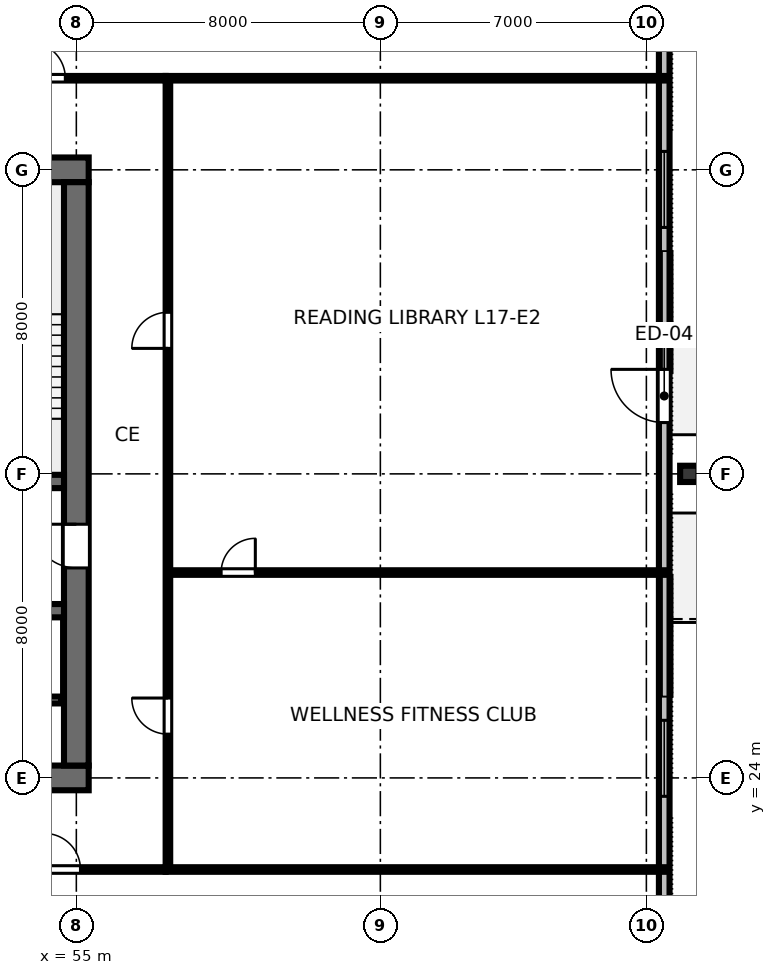
"""IFC4 building model, lengths in metres.
Left out: names, types, materials, properties, quantities, classifications, styles, units other than length and angle.
Written with IfcOpenShell. Run it as: python <this file> out.ifc"""

import sys

from ifc_helpers import new_model, si_unit, direction, frame, frame_2d, origin, origin_2d, place, context, subcontext, project, spatial, rectangle, i_section, extrude, element, fill, save


model = new_model("IFC4")
c1 = context("Model", 3, precision=1e-05, world=origin(), true_north=direction((0.0, 1.0)))
c2 = subcontext(c1, "Body", "Model", "MODEL_VIEW")
j1 = project(units=[si_unit("LENGTHUNIT", "METRE"), si_unit("PLANEANGLEUNIT", "RADIAN")], contexts=[c1])
p1 = place(None, origin())
s1 = spatial("IfcSite", under=j1, at=p1, CompositionType="ELEMENT")
p2 = place(p1, origin())
s2 = spatial("IfcBuilding", under=s1, at=p2, CompositionType="ELEMENT")
p3 = place(p2, frame((0.0, 0.0, 67.6)))
s3 = spatial("IfcBuildingStorey", under=s2, at=p3, CompositionType="ELEMENT", Elevation=67.6)
p4 = place(p3, frame((36.675, 24.0, 0.0), z_axis=(0.0, 0.0, 1.0), x_axis=(1.0, 0.0, 0.0)))
e1 = element("IfcWall", 1, at=p4, inside=s3, PredefinedType="SHEAR", context=c2, shape_type="SweptSolid", body=[
    extrude(rectangle(XDim=18.65, YDim=0.65, at=frame_2d((9.325, 0.0))), origin(), (0.0, 0.0, 1.0), 3.36),
])
p5 = place(p4, frame((5.725, 0.0, 0.0)))
e2 = element("IfcOpeningElement", 2, at=p5, cuts=e1, PredefinedType="OPENING", context=c2, shape_type="SweptSolid", body=[
    extrude(rectangle(XDim=1.6, YDim=2.15, at=frame_2d((0.8, 1.075))), frame((0.0, 0.335, 0.0), z_axis=(0.0, -1.0, 0.0), x_axis=(1.0, 0.0, 0.0)), (0.0, 0.0, 1.0), 0.67),
])
p6 = place(p4, frame((12.125, 0.0, 0.0)))
e3 = element("IfcOpeningElement", 3, at=p6, cuts=e1, PredefinedType="OPENING", context=c2, shape_type="SweptSolid", body=[
    extrude(rectangle(XDim=1.6, YDim=2.15, at=frame_2d((0.8, 1.075))), frame((0.0, 0.335, 0.0), z_axis=(0.0, -1.0, 0.0), x_axis=(1.0, 0.0, 0.0)), (0.0, 0.0, 1.0), 0.67),
])
p7 = place(p3, frame((36.675, 40.0, 0.0), z_axis=(0.0, 0.0, 1.0), x_axis=(1.0, 0.0, 0.0)))
e4 = element("IfcWall", 4, at=p7, inside=s3, PredefinedType="SHEAR", context=c2, shape_type="SweptSolid", body=[
    extrude(rectangle(XDim=18.65, YDim=0.65, at=frame_2d((9.325, 0.0))), origin(), (0.0, 0.0, 1.0), 3.36),
])
p8 = place(p7, frame((10.625, 0.0, 0.0)))
e5 = element("IfcOpeningElement", 5, at=p8, cuts=e4, PredefinedType="OPENING", context=c2, shape_type="SweptSolid", body=[
    extrude(rectangle(XDim=1.0, YDim=2.15, at=frame_2d((0.5, 1.075))), frame((0.0, 0.335, 0.0), z_axis=(0.0, -1.0, 0.0), x_axis=(1.0, 0.0, 0.0)), (0.0, 0.0, 1.0), 0.67),
])
p9 = place(p3, frame((55.0, 24.325, 0.0), z_axis=(0.0, 0.0, 1.0), x_axis=(0.0, 1.0, 0.0)))
e6 = element("IfcWall", 6, at=p9, inside=s3, PredefinedType="SHEAR", context=c2, shape_type="SweptSolid", body=[
    extrude(rectangle(XDim=15.35, YDim=0.65, at=frame_2d((7.675, 0.0))), origin(), (0.0, 0.0, 1.0), 3.36),
])
p10 = place(p9, frame((5.2, 0.0, 0.0)))
e7 = element("IfcOpeningElement", 7, at=p10, cuts=e6, PredefinedType="OPENING", context=c2, shape_type="SweptSolid", body=[
    extrude(rectangle(XDim=1.15, YDim=2.15, at=frame_2d((0.575, 1.075))), frame((0.0, 0.335, 0.0), z_axis=(0.0, -1.0, 0.0), x_axis=(1.0, 0.0, 0.0)), (0.0, 0.0, 1.0), 0.67),
])
p11 = place(p3, frame((37.325, 31.8, 0.0), z_axis=(0.0, 0.0, 1.0), x_axis=(1.0, 0.0, 0.0)))
e8 = element("IfcWall", 8, at=p11, inside=s3, PredefinedType="SHEAR", context=c2, shape_type="SweptSolid", body=[
    extrude(rectangle(XDim=17.35, YDim=0.35, at=frame_2d((8.675, 0.0))), origin(), (0.0, 0.0, 1.0), 3.36),
])
p12 = place(p11, frame((0.725, 0.0, 0.0)))
e9 = element("IfcOpeningElement", 9, at=p12, cuts=e8, PredefinedType="OPENING", context=c2, shape_type="SweptSolid", body=[
    extrude(rectangle(XDim=1.1, YDim=2.15, at=frame_2d((0.55, 1.075))), frame((0.0, 0.185, 0.0), z_axis=(0.0, -1.0, 0.0), x_axis=(1.0, 0.0, 0.0)), (0.0, 0.0, 1.0), 0.37),
])
p13 = place(p11, frame((14.625, 0.0, 0.0)))
e10 = element("IfcOpeningElement", 10, at=p13, cuts=e8, PredefinedType="OPENING", context=c2, shape_type="SweptSolid", body=[
    extrude(rectangle(XDim=1.1, YDim=2.15, at=frame_2d((0.55, 1.075))), frame((0.0, 0.185, 0.0), z_axis=(0.0, -1.0, 0.0), x_axis=(1.0, 0.0, 0.0)), (0.0, 0.0, 1.0), 0.37),
])
p14 = place(p3, frame((37.325, 28.4, 0.0), z_axis=(0.0, 0.0, 1.0), x_axis=(1.0, 0.0, 0.0)))
e11 = element("IfcWall", 11, at=p14, inside=s3, PredefinedType="SHEAR", context=c2, shape_type="SweptSolid", body=[
    extrude(rectangle(XDim=17.35, YDim=0.35, at=frame_2d((8.675, 0.0))), origin(), (0.0, 0.0, 1.0), 3.36),
])
p15 = place(p3, frame((71.13, 32.0, 0.0), z_axis=(0.103698486948, 0.0, 0.994608779272), x_axis=(-0.994608779272, 0.0, 0.103698486948)))
e12 = element("IfcColumn", 12, at=p15, inside=s3, PredefinedType="COLUMN", context=c2, shape_type="SweptSolid", body=[
    extrude(i_section(OverallWidth=0.428, OverallDepth=0.483, WebThickness=0.051, FlangeThickness=0.082, FilletRadius=0.025, at=origin_2d()), origin(), (0.0, 0.0, 1.0), 3.376),
])
p16 = place(p3, frame((70.47, 14.06, 0.0), z_axis=(0.0, 0.0, 1.0), x_axis=(0.0, 1.0, 0.0)))
e13 = element("IfcWall", 13, at=p16, inside=s3, PredefinedType="STANDARD", context=c2, shape_type="SweptSolid", body=[
    extrude(rectangle(XDim=35.88, YDim=0.28, at=frame_2d((17.94, 0.0))), origin(), (0.0, 0.0, 1.0), 3.36),
])
p17 = place(p16, frame((19.29, 0.0, 0.0)))
e14 = element("IfcOpeningElement", 14, at=p17, cuts=e13, PredefinedType="OPENING", context=c2, shape_type="SweptSolid", body=[
    extrude(rectangle(XDim=1.4, YDim=2.15, at=frame_2d((0.7, 1.075))), frame((0.0, 0.15, 0.0), z_axis=(0.0, -1.0, 0.0), x_axis=(1.0, 0.0, 0.0)), (0.0, 0.0, 1.0), 0.3),
])
p18 = place(p16, frame((1.971, 0.0, 0.8)))
e15 = element("IfcOpeningElement", 15, at=p18, cuts=e13, PredefinedType="OPENING", context=c2, shape_type="SweptSolid", body=[
    extrude(rectangle(XDim=2.0, YDim=1.95, at=frame_2d((1.0, 0.975))), frame((0.0, 0.15, 0.0), z_axis=(0.0, -1.0, 0.0), x_axis=(1.0, 0.0, 0.0)), (0.0, 0.0, 1.0), 0.3),
])
p19 = place(p16, frame((9.456, 0.0, 0.8)))
e16 = element("IfcOpeningElement", 16, at=p19, cuts=e13, PredefinedType="OPENING", context=c2, shape_type="SweptSolid", body=[
    extrude(rectangle(XDim=2.0, YDim=1.95, at=frame_2d((1.0, 0.975))), frame((0.0, 0.15, 0.0), z_axis=(0.0, -1.0, 0.0), x_axis=(1.0, 0.0, 0.0)), (0.0, 0.0, 1.0), 0.3),
])
p20 = place(p16, frame((24.424, 0.0, 0.8)))
e17 = element("IfcOpeningElement", 17, at=p20, cuts=e13, PredefinedType="OPENING", context=c2, shape_type="SweptSolid", body=[
    extrude(rectangle(XDim=2.0, YDim=1.95, at=frame_2d((1.0, 0.975))), frame((0.0, 0.15, 0.0), z_axis=(0.0, -1.0, 0.0), x_axis=(1.0, 0.0, 0.0)), (0.0, 0.0, 1.0), 0.3),
])
p21 = place(p16, frame((31.909, 0.0, 0.8)))
e18 = element("IfcOpeningElement", 18, at=p21, cuts=e13, PredefinedType="OPENING", context=c2, shape_type="SweptSolid", body=[
    extrude(rectangle(XDim=2.0, YDim=1.95, at=frame_2d((1.0, 0.975))), frame((0.0, 0.15, 0.0), z_axis=(0.0, -1.0, 0.0), x_axis=(1.0, 0.0, 0.0)), (0.0, 0.0, 1.0), 0.3),
])
p22 = place(p3, frame((37.4, 26.05, 0.0), z_axis=(0.0, 0.0, 1.0), x_axis=(1.0, 0.0, 0.0)))
e19 = element("IfcWall", 19, at=p22, inside=s3, PredefinedType="PARTITIONING", context=c2, shape_type="SweptSolid", body=[
    extrude(rectangle(XDim=17.2, YDim=0.18, at=frame_2d((8.6, 0.0))), origin(), (0.0, 0.0, 1.0), 3.36),
])
p23 = place(p22, frame((1.1, 0.0, 0.0)))
e20 = element("IfcOpeningElement", 20, at=p23, cuts=e19, PredefinedType="OPENING", context=c2, shape_type="SweptSolid", body=[
    extrude(rectangle(XDim=1.05, YDim=2.15, at=frame_2d((0.525, 1.075))), frame((0.0, 0.1, 0.0), z_axis=(0.0, -1.0, 0.0), x_axis=(1.0, 0.0, 0.0)), (0.0, 0.0, 1.0), 0.2),
])
p24 = place(p22, frame((3.0, 0.0, 0.0)))
e21 = element("IfcOpeningElement", 21, at=p24, cuts=e19, PredefinedType="OPENING", context=c2, shape_type="SweptSolid", body=[
    extrude(rectangle(XDim=1.05, YDim=2.15, at=frame_2d((0.525, 1.075))), frame((0.0, 0.1, 0.0), z_axis=(0.0, -1.0, 0.0), x_axis=(1.0, 0.0, 0.0)), (0.0, 0.0, 1.0), 0.2),
])
p25 = place(p3, frame((34.65, 21.59, 0.0), z_axis=(0.0, 0.0, 1.0), x_axis=(1.0, 0.0, 0.0)))
e22 = element("IfcWall", 22, at=p25, inside=s3, PredefinedType="PARTITIONING", context=c2, shape_type="SweptSolid", body=[
    extrude(rectangle(XDim=22.7, YDim=0.12, at=frame_2d((11.35, 0.0))), origin(), (0.0, 0.0, 1.0), 2.64),
])
p26 = place(p25, frame((3.365, 0.0, 0.0)))
e23 = element("IfcOpeningElement", 23, at=p26, cuts=e22, PredefinedType="OPENING", context=c2, shape_type="SweptSolid", body=[
    extrude(rectangle(XDim=0.95, YDim=2.15, at=frame_2d((0.475, 1.075))), frame((0.0, 0.07, 0.0), z_axis=(0.0, -1.0, 0.0), x_axis=(1.0, 0.0, 0.0)), (0.0, 0.0, 1.0), 0.14),
])
p27 = place(p25, frame((8.718, 0.0, 0.0)))
e24 = element("IfcOpeningElement", 24, at=p27, cuts=e22, PredefinedType="OPENING", context=c2, shape_type="SweptSolid", body=[
    extrude(rectangle(XDim=0.95, YDim=2.15, at=frame_2d((0.475, 1.075))), frame((0.0, 0.07, 0.0), z_axis=(0.0, -1.0, 0.0), x_axis=(1.0, 0.0, 0.0)), (0.0, 0.0, 1.0), 0.14),
])
p28 = place(p25, frame((13.651, 0.0, 0.0)))
e25 = element("IfcOpeningElement", 25, at=p28, cuts=e22, PredefinedType="OPENING", context=c2, shape_type="SweptSolid", body=[
    extrude(rectangle(XDim=0.95, YDim=2.15, at=frame_2d((0.475, 1.075))), frame((0.0, 0.07, 0.0), z_axis=(0.0, -1.0, 0.0), x_axis=(1.0, 0.0, 0.0)), (0.0, 0.0, 1.0), 0.14),
])
p29 = place(p25, frame((19.509, 0.0, 0.0)))
e26 = element("IfcOpeningElement", 26, at=p29, cuts=e22, PredefinedType="OPENING", context=c2, shape_type="SweptSolid", body=[
    extrude(rectangle(XDim=0.95, YDim=2.15, at=frame_2d((0.475, 1.075))), frame((0.0, 0.07, 0.0), z_axis=(0.0, -1.0, 0.0), x_axis=(1.0, 0.0, 0.0)), (0.0, 0.0, 1.0), 0.14),
])
p30 = place(p3, frame((34.65, 42.41, 0.0), z_axis=(0.0, 0.0, 1.0), x_axis=(1.0, 0.0, 0.0)))
e27 = element("IfcWall", 27, at=p30, inside=s3, PredefinedType="PARTITIONING", context=c2, shape_type="SweptSolid", body=[
    extrude(rectangle(XDim=22.7, YDim=0.12, at=frame_2d((11.35, 0.0))), origin(), (0.0, 0.0, 1.0), 2.64),
])
p31 = place(p30, frame((2.59, 0.0, 0.0)))
e28 = element("IfcOpeningElement", 28, at=p31, cuts=e27, PredefinedType="OPENING", context=c2, shape_type="SweptSolid", body=[
    extrude(rectangle(XDim=0.95, YDim=2.15, at=frame_2d((0.475, 1.075))), frame((0.0, 0.07, 0.0), z_axis=(0.0, -1.0, 0.0), x_axis=(1.0, 0.0, 0.0)), (0.0, 0.0, 1.0), 0.14),
])
p32 = place(p30, frame((8.768, 0.0, 0.0)))
e29 = element("IfcOpeningElement", 29, at=p32, cuts=e27, PredefinedType="OPENING", context=c2, shape_type="SweptSolid", body=[
    extrude(rectangle(XDim=0.95, YDim=2.15, at=frame_2d((0.475, 1.075))), frame((0.0, 0.07, 0.0), z_axis=(0.0, -1.0, 0.0), x_axis=(1.0, 0.0, 0.0)), (0.0, 0.0, 1.0), 0.14),
])
p33 = place(p30, frame((14.079, 0.0, 0.0)))
e30 = element("IfcOpeningElement", 30, at=p33, cuts=e27, PredefinedType="OPENING", context=c2, shape_type="SweptSolid", body=[
    extrude(rectangle(XDim=0.95, YDim=2.15, at=frame_2d((0.475, 1.075))), frame((0.0, 0.07, 0.0), z_axis=(0.0, -1.0, 0.0), x_axis=(1.0, 0.0, 0.0)), (0.0, 0.0, 1.0), 0.14),
])
p34 = place(p30, frame((19.11, 0.0, 0.0)))
e31 = element("IfcOpeningElement", 31, at=p34, cuts=e27, PredefinedType="OPENING", context=c2, shape_type="SweptSolid", body=[
    extrude(rectangle(XDim=0.95, YDim=2.15, at=frame_2d((0.475, 1.075))), frame((0.0, 0.07, 0.0), z_axis=(0.0, -1.0, 0.0), x_axis=(1.0, 0.0, 0.0)), (0.0, 0.0, 1.0), 0.14),
])
p35 = place(p3, frame((57.41, 29.404, 0.0), z_axis=(0.0, 0.0, 1.0), x_axis=(1.0, 0.0, 0.0)))
e32 = element("IfcWall", 32, at=p35, inside=s3, PredefinedType="PARTITIONING", context=c2, shape_type="SweptSolid", body=[
    extrude(rectangle(XDim=13.06, YDim=0.12, at=frame_2d((6.53, 0.0))), origin(), (0.0, 0.0, 1.0), 2.64),
])
p36 = place(p35, frame((1.4, 0.0, 0.0)))
e33 = element("IfcOpeningElement", 33, at=p36, cuts=e32, PredefinedType="OPENING", context=c2, shape_type="SweptSolid", body=[
    extrude(rectangle(XDim=0.9, YDim=2.15, at=frame_2d((0.45, 1.075))), frame((0.0, 0.07, 0.0), z_axis=(0.0, -1.0, 0.0), x_axis=(1.0, 0.0, 0.0)), (0.0, 0.0, 1.0), 0.14),
])
p37 = place(p3, frame((57.41, 21.65, 0.0), z_axis=(0.0, 0.0, 1.0), x_axis=(0.0, 1.0, 0.0)))
e34 = element("IfcWall", 34, at=p37, inside=s3, PredefinedType="PARTITIONING", context=c2, shape_type="SweptSolid", body=[
    extrude(rectangle(XDim=20.7, YDim=0.12, at=frame_2d((10.35, 0.0))), origin(), (0.0, 0.0, 1.0), 2.64),
])
p38 = place(p37, frame((3.502, 0.0, 0.0)))
e35 = element("IfcOpeningElement", 35, at=p38, cuts=e34, PredefinedType="OPENING", context=c2, shape_type="SweptSolid", body=[
    extrude(rectangle(XDim=0.95, YDim=2.15, at=frame_2d((0.475, 1.075))), frame((0.0, 0.07, 0.0), z_axis=(0.0, -1.0, 0.0), x_axis=(1.0, 0.0, 0.0)), (0.0, 0.0, 1.0), 0.14),
])
p39 = place(p37, frame((13.652, 0.0, 0.0)))
e36 = element("IfcOpeningElement", 36, at=p39, cuts=e34, PredefinedType="OPENING", context=c2, shape_type="SweptSolid", body=[
    extrude(rectangle(XDim=0.95, YDim=2.15, at=frame_2d((0.475, 1.075))), frame((0.0, 0.07, 0.0), z_axis=(0.0, -1.0, 0.0), x_axis=(1.0, 0.0, 0.0)), (0.0, 0.0, 1.0), 0.14),
])
for number, where, z_axis, x_axis in (
    (37, (57.35, 21.59, 0.0), (0.0, 0.0, 1.0), (1.0, 0.0, 0.0)),
    (38, (57.35, 42.41, 0.0), (0.0, 0.0, 1.0), (1.0, 0.0, 0.0)),
):
    element("IfcWall", number, at=place(p3, frame(where, z_axis=z_axis, x_axis=x_axis)), inside=s3, PredefinedType="PARTITIONING", context=c2, shape_type="SweptSolid", body=[
        extrude(rectangle(XDim=13.12, YDim=0.12, at=frame_2d((6.56, 0.0))), origin(), (0.0, 0.0, 1.0), 2.64),
    ])
p40 = place(p17, origin())
e39 = element("IfcDoor", 39, at=p40, inside=s3, OperationType="SINGLE_SWING_RIGHT", PredefinedType="DOOR", context=c2, shape_type="SweptSolid", body=[
    extrude(rectangle(XDim=1.4, YDim=2.15, at=frame_2d((0.7, 1.075))), frame((0.0, 0.025, 0.0), z_axis=(0.0, -1.0, 0.0), x_axis=(1.0, 0.0, 0.0)), (0.0, 0.0, 1.0), 0.05),
])
fill(e14, e39)
p41 = place(p19, origin())
e40 = element("IfcWindow", 40, at=p41, inside=s3, PartitioningType="SINGLE_PANEL", PredefinedType="WINDOW", context=c2, shape_type="SweptSolid", body=[
    extrude(rectangle(XDim=2.0, YDim=1.95, at=frame_2d((1.0, 0.975))), frame((0.0, 0.03, 0.0), z_axis=(0.0, -1.0, 0.0), x_axis=(1.0, 0.0, 0.0)), (0.0, 0.0, 1.0), 0.06),
])
fill(e16, e40)
p42 = place(p20, origin())
e41 = element("IfcWindow", 41, at=p42, inside=s3, PartitioningType="SINGLE_PANEL", PredefinedType="WINDOW", context=c2, shape_type="SweptSolid", body=[
    extrude(rectangle(XDim=2.0, YDim=1.95, at=frame_2d((1.0, 0.975))), frame((0.0, 0.03, 0.0), z_axis=(0.0, -1.0, 0.0), x_axis=(1.0, 0.0, 0.0)), (0.0, 0.0, 1.0), 0.06),
])
fill(e17, e41)
p43 = place(p10, origin())
e42 = element("IfcDoor", 42, at=p43, inside=s3, OperationType="SINGLE_SWING_RIGHT", PredefinedType="DOOR", context=c2, shape_type="SweptSolid", body=[
    extrude(rectangle(XDim=1.15, YDim=2.15, at=frame_2d((0.575, 1.075))), frame((0.0, 0.025, 0.0), z_axis=(0.0, -1.0, 0.0), x_axis=(1.0, 0.0, 0.0)), (0.0, 0.0, 1.0), 0.05),
])
fill(e7, e42)
p44 = place(p29, origin())
e43 = element("IfcDoor", 43, at=p44, inside=s3, OperationType="SINGLE_SWING_LEFT", PredefinedType="DOOR", context=c2, shape_type="SweptSolid", body=[
    extrude(rectangle(XDim=0.95, YDim=2.15, at=frame_2d((0.475, 1.075))), frame((0.0, 0.025, 0.0), z_axis=(0.0, -1.0, 0.0), x_axis=(1.0, 0.0, 0.0)), (0.0, 0.0, 1.0), 0.05),
])
fill(e26, e43)
p45 = place(p34, origin())
e44 = element("IfcDoor", 44, at=p45, inside=s3, OperationType="SINGLE_SWING_LEFT", PredefinedType="DOOR", context=c2, shape_type="SweptSolid", body=[
    extrude(rectangle(XDim=0.95, YDim=2.15, at=frame_2d((0.475, 1.075))), frame((0.0, 0.025, 0.0), z_axis=(0.0, -1.0, 0.0), x_axis=(1.0, 0.0, 0.0)), (0.0, 0.0, 1.0), 0.05),
])
fill(e31, e44)
p46 = place(p36, origin())
e45 = element("IfcDoor", 45, at=p46, inside=s3, OperationType="SINGLE_SWING_RIGHT", PredefinedType="DOOR", context=c2, shape_type="SweptSolid", body=[
    extrude(rectangle(XDim=0.9, YDim=2.15, at=frame_2d((0.45, 1.075))), frame((0.0, 0.025, 0.0), z_axis=(0.0, -1.0, 0.0), x_axis=(1.0, 0.0, 0.0)), (0.0, 0.0, 1.0), 0.05),
])
fill(e33, e45)
p47 = place(p38, origin())
e46 = element("IfcDoor", 46, at=p47, inside=s3, OperationType="SINGLE_SWING_RIGHT", PredefinedType="DOOR", context=c2, shape_type="SweptSolid", body=[
    extrude(rectangle(XDim=0.95, YDim=2.15, at=frame_2d((0.475, 1.075))), frame((0.0, 0.025, 0.0), z_axis=(0.0, -1.0, 0.0), x_axis=(1.0, 0.0, 0.0)), (0.0, 0.0, 1.0), 0.05),
])
fill(e35, e46)
p48 = place(p39, origin())
e47 = element("IfcDoor", 47, at=p48, inside=s3, OperationType="SINGLE_SWING_LEFT", PredefinedType="DOOR", context=c2, shape_type="SweptSolid", body=[
    extrude(rectangle(XDim=0.95, YDim=2.15, at=frame_2d((0.475, 1.075))), frame((0.0, 0.025, 0.0), z_axis=(0.0, -1.0, 0.0), x_axis=(1.0, 0.0, 0.0)), (0.0, 0.0, 1.0), 0.05),
])
fill(e36, e47)
save(model, sys.argv[1])
